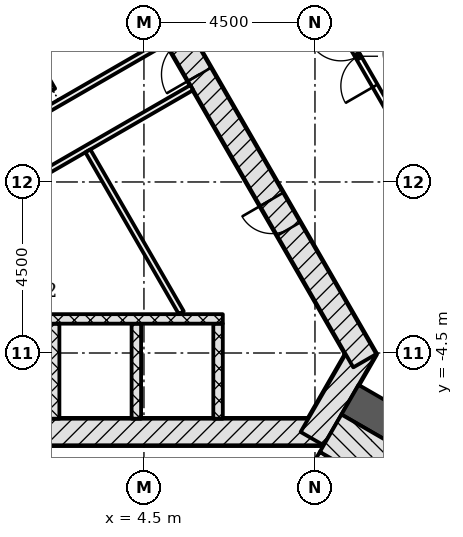
"""IFC4 building model, lengths in metres.
Left out: names, types, materials, properties, quantities, classifications, styles, units other than length and angle.
Written with IfcOpenShell. Run it as: python <this file> out.ifc"""

import sys

from ifc_helpers import new_model, si_unit, direction, frame, frame_2d, origin, place, context, subcontext, project, spatial, rectangle, extrude, element, fill, save


model = new_model("IFC4")
c1 = context("Model", 3, precision=1e-05, world=origin(), true_north=direction((0.0, 1.0)))
c2 = subcontext(c1, "Body", "Model", "MODEL_VIEW")
j1 = project(units=[si_unit("LENGTHUNIT", "METRE"), si_unit("PLANEANGLEUNIT", "RADIAN")], contexts=[c1])
p1 = place(None, origin())
s1 = spatial("IfcSite", under=j1, at=p1, CompositionType="ELEMENT")
p2 = place(p1, origin())
s2 = spatial("IfcBuilding", under=s1, at=p2, CompositionType="ELEMENT")
p3 = place(p2, frame((0.0, 0.0, -4.5)))
s3 = spatial("IfcBuildingStorey", under=s2, at=p3, CompositionType="ELEMENT", Elevation=-4.5)
p4 = place(p3, frame((-9.229, -6.578, -0.3), z_axis=(0.0, 0.0, 1.0), x_axis=(1.0, 0.0, 0.0)))
e1 = element("IfcWall", 1, at=p4, inside=s3, PredefinedType="SHEAR", context=c2, shape_type="SweptSolid", body=[
    extrude(rectangle(XDim=18.458, YDim=0.7, at=frame_2d((9.229, 0.0))), origin(), (0.0, 0.0, 1.0), 4.55),
])
p5 = place(p4, frame((1.079, 0.0, 0.3)))
e2 = element("IfcOpeningElement", 2, at=p5, cuts=e1, PredefinedType="OPENING", context=c2, shape_type="SweptSolid", body=[
    extrude(rectangle(XDim=0.9, YDim=2.1, at=frame_2d((0.45, 1.05))), frame((0.0, 0.36, 0.0), z_axis=(0.0, -1.0, 0.0), x_axis=(1.0, 0.0, 0.0)), (0.0, 0.0, 1.0), 0.72),
])
p6 = place(p3, frame((8.926, -6.753, -0.3), z_axis=(0.0, 0.0, 1.0), x_axis=(0.500042739161, 0.866000726912, 0.0)))
e3 = element("IfcWall", 3, at=p6, inside=s3, PredefinedType="SHEAR", context=c2, shape_type="SweptSolid", body=[
    extrude(rectangle(XDim=2.771, YDim=0.7, at=frame_2d((1.386, 0.0))), origin(), (0.0, 0.0, 1.0), 4.55),
])
p7 = place(p3, frame((10.311, -4.703, -0.3), z_axis=(0.0, 0.0, 1.0), x_axis=(-0.500001446645, 0.866024568562, 0.0)))
e4 = element("IfcWall", 4, at=p7, inside=s3, PredefinedType="SHEAR", context=c2, shape_type="SweptSolid", body=[
    extrude(rectangle(XDim=18.458, YDim=0.7, at=frame_2d((9.229, 0.0))), origin(), (0.0, 0.0, 1.0), 4.55),
])
p8 = place(p7, frame((8.7, 0.0, 0.3)))
e5 = element("IfcOpeningElement", 5, at=p8, cuts=e4, PredefinedType="OPENING", context=c2, shape_type="SweptSolid", body=[
    extrude(rectangle(XDim=1.0, YDim=2.1, at=frame_2d((0.5, 1.05))), frame((0.0, 0.36, 0.0), z_axis=(0.0, -1.0, 0.0), x_axis=(1.0, 0.0, 0.0)), (0.0, 0.0, 1.0), 0.72),
])
p9 = place(p7, frame((4.002, 0.0, 0.3)))
e6 = element("IfcOpeningElement", 6, at=p9, cuts=e4, PredefinedType="OPENING", context=c2, shape_type="SweptSolid", body=[
    extrude(rectangle(XDim=0.9, YDim=2.1, at=frame_2d((0.45, 1.05))), frame((0.0, 0.36, 0.0), z_axis=(0.0, -1.0, 0.0), x_axis=(1.0, 0.0, 0.0)), (0.0, 0.0, 1.0), 0.72),
])
p10 = place(p7, frame((14.093, 0.0, 0.3)))
e7 = element("IfcOpeningElement", 7, at=p10, cuts=e4, PredefinedType="OPENING", context=c2, shape_type="SweptSolid", body=[
    extrude(rectangle(XDim=0.9, YDim=2.1, at=frame_2d((0.45, 1.05))), frame((0.0, 0.36, 0.0), z_axis=(0.0, -1.0, 0.0), x_axis=(1.0, 0.0, 0.0)), (0.0, 0.0, 1.0), 0.72),
])
p11 = place(p3, frame((9.922, -5.728, -0.3), z_axis=(0.0, 0.0, 1.0), x_axis=(0.866028046028, -0.499995423472, 0.0)))
e8 = element("IfcWall", 8, at=p11, inside=s3, PredefinedType="SHEAR", context=c2, shape_type="SweptSolid", body=[
    extrude(rectangle(XDim=14.633, YDim=0.9, at=frame_2d((7.316, 0.0))), origin(), (0.0, 0.0, 1.0), 4.55),
])
p12 = place(p11, frame((7.35, 0.0, 0.3)))
e9 = element("IfcOpeningElement", 9, at=p12, cuts=e8, PredefinedType="OPENING", context=c2, shape_type="SweptSolid", body=[
    extrude(rectangle(XDim=1.5, YDim=2.1, at=frame_2d((0.75, 1.05))), frame((0.0, 0.46, 0.0), z_axis=(0.0, -1.0, 0.0), x_axis=(1.0, 0.0, 0.0)), (0.0, 0.0, 1.0), 0.92),
])
for number, where, z_axis, x_axis in (
    (10, (2.15, -6.228, 0.0), (0.0, 0.0, 1.0), (0.0, 1.0, 0.0)),
    (11, (4.3, -6.228, 0.0), (0.0, 0.0, 1.0), (0.0, 1.0, 0.0)),
    (12, (6.45, -6.228, 0.0), (0.0, 0.0, 1.0), (0.0, 1.0, 0.0)),
):
    element("IfcWall", number, at=place(p3, frame(where, z_axis=z_axis, x_axis=x_axis)), inside=s3, PredefinedType="PARTITIONING", context=c2, shape_type="SweptSolid", body=[
        extrude(rectangle(XDim=2.5, YDim=0.25, at=frame_2d((1.25, 0.0))), origin(), (0.0, 0.0, 1.0), 4.25),
    ])
p13 = place(p3, frame((-6.575, -3.603, 0.0), z_axis=(0.0, 0.0, 1.0), x_axis=(1.0, 0.0, 0.0)))
e13 = element("IfcWall", 13, at=p13, inside=s3, PredefinedType="PARTITIONING", context=c2, shape_type="SweptSolid", body=[
    extrude(rectangle(XDim=13.15, YDim=0.25, at=frame_2d((6.575, 0.0))), origin(), (0.0, 0.0, 1.0), 4.25),
])
p14 = place(p3, frame((-4.548, -1.851, 0.0), z_axis=(0.0, 0.0, 1.0), x_axis=(0.866023939251, 0.500002536638, 0.0)))
e14 = element("IfcWall", 14, at=p14, inside=s3, PredefinedType="PARTITIONING", context=c2, shape_type="SweptSolid", body=[
    extrude(rectangle(XDim=11.092, YDim=0.15, at=frame_2d((5.546, 0.0))), origin(), (0.0, 0.0, 1.0), 4.25),
])
p15 = place(p14, frame((3.497, 0.0, 0.0)))
e15 = element("IfcOpeningElement", 15, at=p15, cuts=e14, PredefinedType="OPENING", context=c2, shape_type="SweptSolid", body=[
    extrude(rectangle(XDim=0.9, YDim=2.1, at=frame_2d((0.45, 1.05))), frame((0.0, 0.085, 0.0), z_axis=(0.0, -1.0, 0.0), x_axis=(1.0, 0.0, 0.0)), (0.0, 0.0, 1.0), 0.17),
])
p16 = place(p3, frame((2.099, 2.42, 0.0), z_axis=(0.0, 0.0, 1.0), x_axis=(-0.499998449073, 0.866026299211, 0.0)))
e16 = element("IfcWall", 16, at=p16, inside=s3, PredefinedType="PARTITIONING", context=c2, shape_type="SweptSolid", body=[
    extrude(rectangle(XDim=4.211, YDim=0.15, at=frame_2d((2.106, 0.0))), origin(), (0.0, 0.0, 1.0), 4.25),
])
p17 = place(p3, frame((-4.454, -3.413, 0.0), z_axis=(0.0, 0.0, 1.0), x_axis=(0.86603043987, 0.499991277142, 0.0)))
e17 = element("IfcWall", 17, at=p17, inside=s3, PredefinedType="PARTITIONING", context=c2, shape_type="SweptSolid", body=[
    extrude(rectangle(XDim=11.792, YDim=0.15, at=frame_2d((5.896, 0.0))), origin(), (0.0, 0.0, 1.0), 4.25),
])
p18 = place(p17, frame((3.847, 0.0, 0.0)))
e18 = element("IfcOpeningElement", 18, at=p18, cuts=e17, PredefinedType="OPENING", context=c2, shape_type="SweptSolid", body=[
    extrude(rectangle(XDim=0.9, YDim=2.1, at=frame_2d((0.45, 1.05))), frame((0.0, 0.085, 0.0), z_axis=(0.0, -1.0, 0.0), x_axis=(1.0, 0.0, 0.0)), (0.0, 0.0, 1.0), 0.17),
])
p19 = place(p3, frame((5.482, -3.439, 0.0), z_axis=(0.0, 0.0, 1.0), x_axis=(-0.500006183238, 0.866021833861, 0.0)))
e19 = element("IfcWall", 19, at=p19, inside=s3, PredefinedType="PARTITIONING", context=c2, shape_type="SweptSolid", body=[
    extrude(rectangle(XDim=4.916, YDim=0.15, at=frame_2d((2.458, 0.0))), origin(), (0.0, 0.0, 1.0), 4.25),
])
p20 = place(p3, frame((7.44, -10.226, -0.3), z_axis=(0.0, 0.0, 1.0), x_axis=(0.500022077904, 0.866012656725, 0.0)))
e20 = element("IfcWall", 20, at=p20, inside=s3, PredefinedType="SHEAR", context=c2, shape_type="SweptSolid", body=[
    extrude(rectangle(XDim=3.55, YDim=0.2, at=frame_2d((1.775, 0.0))), origin(), (0.0, 0.0, 1.0), 4.55),
])
p21 = place(p20, frame((1.175, 0.0, 0.3)))
e21 = element("IfcOpeningElement", 21, at=p21, cuts=e20, PredefinedType="OPENING", context=c2, shape_type="SweptSolid", body=[
    extrude(rectangle(XDim=1.2, YDim=2.1, at=frame_2d((0.6, 1.05))), frame((0.0, 0.11, 0.0), z_axis=(0.0, -1.0, 0.0), x_axis=(1.0, 0.0, 0.0)), (0.0, 0.0, 1.0), 0.22),
])
p22 = place(p3, frame((9.413, -6.61, -0.3), z_axis=(0.0, 0.0, 1.0), x_axis=(0.866018442252, -0.500012057535, 0.0)))
e22 = element("IfcWall", 22, at=p22, inside=s3, PredefinedType="SHEAR", context=c2, shape_type="SweptSolid", body=[
    extrude(rectangle(XDim=7.2, YDim=1.136, at=frame_2d((3.6, 0.0))), origin(), (0.0, 0.0, 1.0), 4.55),
])
p23 = place(p3, frame((11.206, 1.446, 0.0), z_axis=(0.0, 0.0, 1.0), x_axis=(-0.500044734646, 0.865999574684, 0.0)))
e23 = element("IfcWall", 23, at=p23, inside=s3, PredefinedType="PARTITIONING", context=c2, shape_type="SweptSolid", body=[
    extrude(rectangle(XDim=4.35, YDim=0.15, at=frame_2d((2.175, 0.0))), origin(), (0.0, 0.0, 1.0), 3.638),
])
p24 = place(p23, frame((1.25, 0.0, 0.0)))
e24 = element("IfcOpeningElement", 24, at=p24, cuts=e23, PredefinedType="OPENING", context=c2, shape_type="SweptSolid", body=[
    extrude(rectangle(XDim=1.8, YDim=2.1, at=frame_2d((0.9, 1.05))), frame((0.0, 0.085, 0.0), z_axis=(0.0, -1.0, 0.0), x_axis=(1.0, 0.0, 0.0)), (0.0, 0.0, 1.0), 0.17),
])
p25 = place(p8, origin())
e25 = element("IfcDoor", 25, at=p25, inside=s3, OperationType="SINGLE_SWING_LEFT", PredefinedType="DOOR", context=c2, shape_type="SweptSolid", body=[
    extrude(rectangle(XDim=1.0, YDim=2.1, at=frame_2d((0.5, 1.05))), frame((0.0, 0.075, 0.0), z_axis=(0.0, -1.0, 0.0), x_axis=(1.0, 0.0, 0.0)), (0.0, 0.0, 1.0), 0.15),
])
fill(e5, e25)
p26 = place(p9, origin())
e26 = element("IfcDoor", 26, at=p26, inside=s3, OperationType="SINGLE_SWING_RIGHT", PredefinedType="DOOR", context=c2, shape_type="SweptSolid", body=[
    extrude(rectangle(XDim=0.9, YDim=2.1, at=frame_2d((0.45, 1.05))), frame((0.0, 0.075, 0.0), z_axis=(0.0, -1.0, 0.0), x_axis=(1.0, 0.0, 0.0)), (0.0, 0.0, 1.0), 0.15),
])
fill(e6, e26)
p27 = place(p24, origin())
e27 = element("IfcDoor", 27, at=p27, inside=s3, OperationType="DOUBLE_DOOR_SINGLE_SWING", PredefinedType="DOOR", context=c2, shape_type="SweptSolid", body=[
    extrude(rectangle(XDim=1.8, YDim=2.1, at=frame_2d((0.9, 1.05))), frame((0.0, 0.025, 0.0), z_axis=(0.0, -1.0, 0.0), x_axis=(1.0, 0.0, 0.0)), (0.0, 0.0, 1.0), 0.05),
])
fill(e24, e27)
save(model, sys.argv[1])
